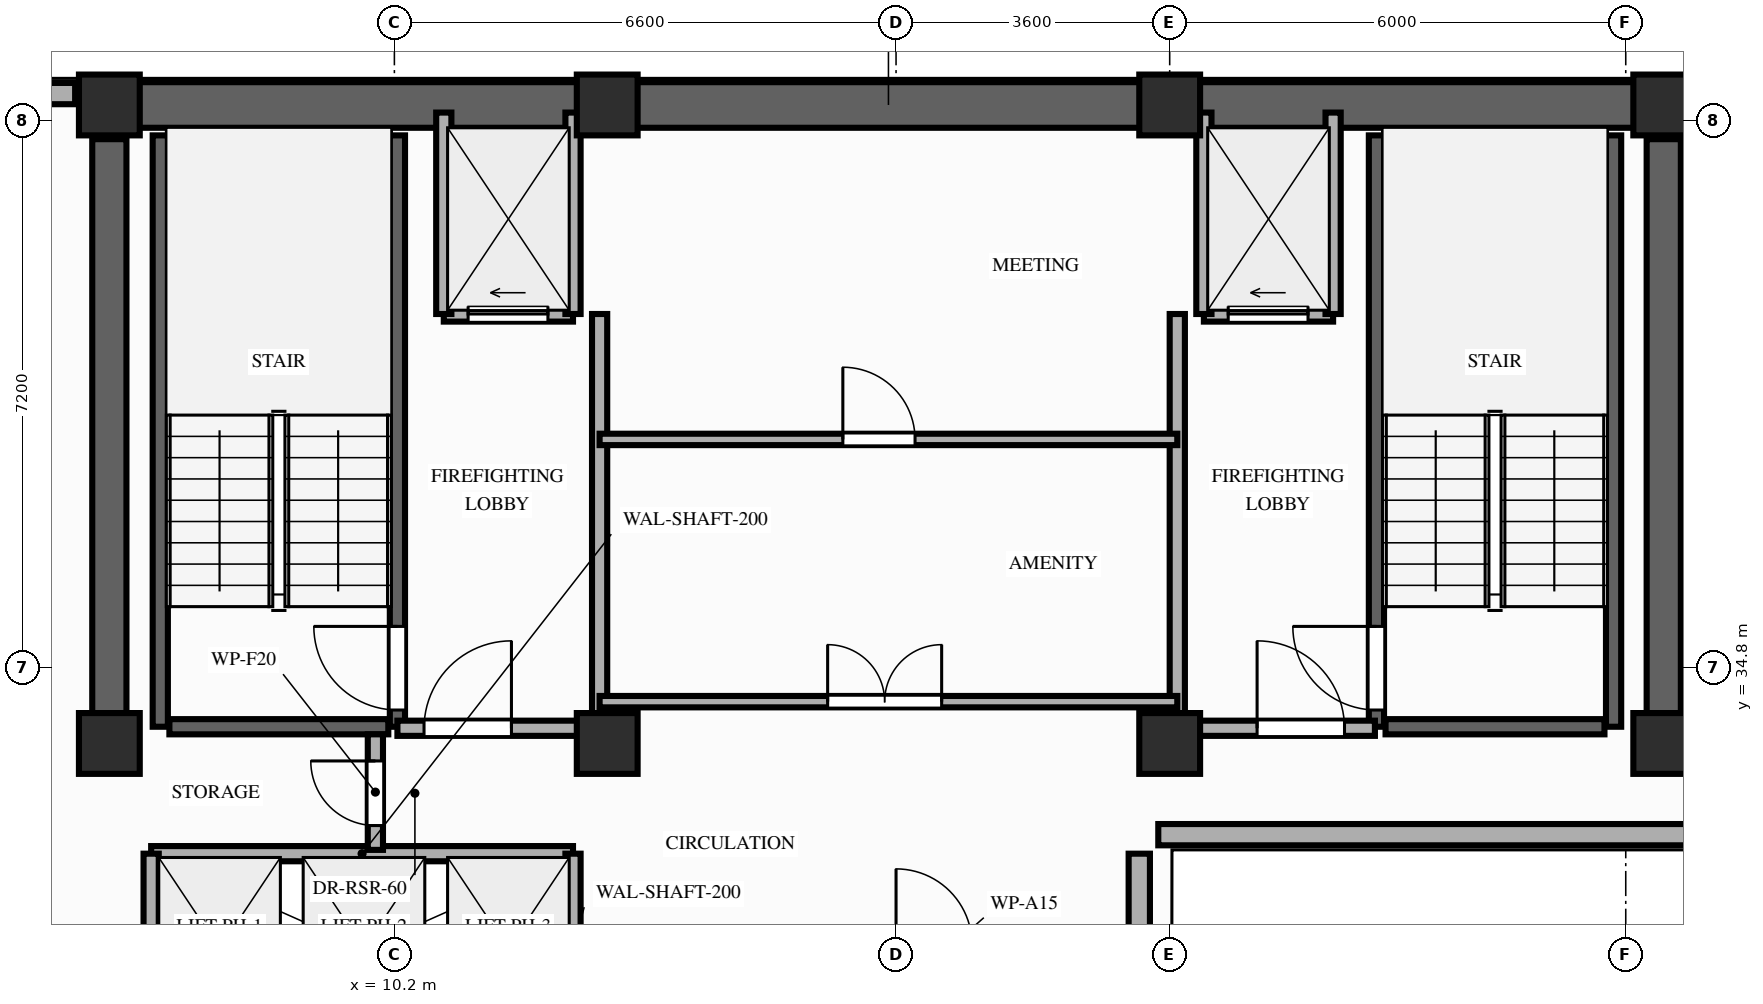
"""IFC4 building model, lengths in metres.
Left out: names, types, materials, properties, quantities, classifications, styles, units other than length and angle.
Written with IfcOpenShell. Run it as: python <this file> out.ifc"""

import sys

from ifc_helpers import new_model, si_unit, direction, frame, frame_2d, origin, origin_2d, place, context, subcontext, project, spatial, rectangle, extrude, element, fill, save


model = new_model("IFC4")
c1 = context("Model", 3, precision=1e-05, world=origin(), true_north=direction((0.0, 1.0)))
c2 = subcontext(c1, "Body", "Model", "MODEL_VIEW")
j1 = project(units=[si_unit("LENGTHUNIT", "METRE"), si_unit("PLANEANGLEUNIT", "RADIAN")], contexts=[c1])
p1 = place(None, origin())
s1 = spatial("IfcSite", under=j1, at=p1, CompositionType="ELEMENT")
p2 = place(p1, origin())
s2 = spatial("IfcBuilding", under=s1, at=p2, CompositionType="ELEMENT")
p3 = place(p2, frame((0.0, 0.0, 224.8)))
s3 = spatial("IfcBuildingStorey", under=s2, at=p3, CompositionType="ELEMENT", Elevation=224.8)
for number, where, z_axis, x_axis in (
    (1, (6.45, 33.8, 0.0), (0.0, 0.0, 1.0), (1.0, 0.0, 0.0)),
    (2, (13.0, 33.8, 0.0), (0.0, 0.0, 1.0), (1.0, 0.0, 0.0)),
    (3, (20.4, 33.8, 0.0), (0.0, 0.0, 1.0), (1.0, 0.0, 0.0)),
    (4, (26.9, 33.8, 0.0), (0.0, 0.0, 1.0), (1.0, 0.0, 0.0)),
    (5, (6.45, 42.2, 0.0), (0.0, 0.0, 1.0), (1.0, 0.0, 0.0)),
    (6, (13.0, 42.2, 0.0), (0.0, 0.0, 1.0), (1.0, 0.0, 0.0)),
    (7, (20.4, 42.2, 0.0), (0.0, 0.0, 1.0), (1.0, 0.0, 0.0)),
    (8, (26.9, 42.2, 0.0), (0.0, 0.0, 1.0), (1.0, 0.0, 0.0)),
):
    element("IfcColumn", number, at=place(p3, frame(where, z_axis=z_axis, x_axis=x_axis)), inside=s3, PredefinedType="COLUMN", context=c2, shape_type="SweptSolid", body=[
        extrude(rectangle(XDim=0.8, YDim=0.8, at=origin_2d()), origin(), (0.0, 0.0, 1.0), 3.2),
    ])
p4 = place(p3, frame((20.0, 8.8, 0.0), z_axis=(0.0, 0.0, 1.0), x_axis=(0.0, 1.0, 0.0)))
e9 = element("IfcWall", 9, at=p4, inside=s3, PredefinedType="STANDARD", context=c2, shape_type="SweptSolid", body=[
    extrude(rectangle(XDim=23.55, YDim=0.28, at=frame_2d((11.775, 0.0))), origin(), (0.0, 0.0, 1.0), 2.51),
])
p5 = place(p4, frame((4.58, 0.0, 0.85)))
e10 = element("IfcOpeningElement", 10, at=p5, cuts=e9, PredefinedType="OPENING", context=c2, shape_type="SweptSolid", body=[
    extrude(rectangle(XDim=0.8, YDim=1.41, at=frame_2d((0.4, 0.705))), frame((0.0, 0.15, 0.0), z_axis=(0.0, -1.0, 0.0), x_axis=(1.0, 0.0, 0.0)), (0.0, 0.0, 1.0), 0.3),
])
p6 = place(p4, frame((5.95, 0.0, 0.85)))
e11 = element("IfcOpeningElement", 11, at=p6, cuts=e9, PredefinedType="OPENING", context=c2, shape_type="SweptSolid", body=[
    extrude(rectangle(XDim=1.5, YDim=1.41, at=frame_2d((0.75, 0.705))), frame((0.0, 0.15, 0.0), z_axis=(0.0, -1.0, 0.0), x_axis=(1.0, 0.0, 0.0)), (0.0, 0.0, 1.0), 0.3),
])
p7 = place(p4, frame((10.85, 0.0, 0.85)))
e12 = element("IfcOpeningElement", 12, at=p7, cuts=e9, PredefinedType="OPENING", context=c2, shape_type="SweptSolid", body=[
    extrude(rectangle(XDim=2.1, YDim=1.41, at=frame_2d((1.05, 0.705))), frame((0.0, 0.15, 0.0), z_axis=(0.0, -1.0, 0.0), x_axis=(1.0, 0.0, 0.0)), (0.0, 0.0, 1.0), 0.3),
])
p8 = place(p3, frame((6.0, 42.35, 0.0), z_axis=(0.0, 0.0, 1.0), x_axis=(-1.0, 0.0, 0.0)))
e13 = element("IfcWall", 13, at=p8, inside=s3, PredefinedType="STANDARD", context=c2, shape_type="SweptSolid", body=[
    extrude(rectangle(XDim=2.0, YDim=0.28, at=frame_2d((1.0, 0.0))), origin(), (0.0, 0.0, 1.0), 3.02),
])
p9 = place(p3, frame((20.25, 32.6, 0.0), z_axis=(0.0, 0.0, 1.0), x_axis=(1.0, 0.0, 0.0)))
e14 = element("IfcWall", 14, at=p9, inside=s3, PredefinedType="STANDARD", context=c2, shape_type="SweptSolid", body=[
    extrude(rectangle(XDim=7.35, YDim=0.28, at=frame_2d((3.675, 0.0))), origin(), (0.0, 0.0, 1.0), 2.51),
])
p10 = place(p3, frame((6.45, 42.2, 0.0), z_axis=(0.0, 0.0, 1.0), x_axis=(1.0, 0.0, 0.0)))
e15 = element("IfcWall", 15, at=p10, inside=s3, PredefinedType="SHEAR", context=c2, shape_type="SweptSolid", body=[
    extrude(rectangle(XDim=20.45, YDim=0.6, at=frame_2d((10.225, 0.0))), origin(), (0.0, 0.0, 1.0), 3.02),
])
for number, where, z_axis, x_axis in (
    (16, (6.45, 33.8, 0.0), (0.0, 0.0, 1.0), (0.0, 1.0, 0.0)),
    (17, (26.9, 33.8, 0.0), (0.0, 0.0, 1.0), (0.0, 1.0, 0.0)),
):
    element("IfcWall", number, at=place(p3, frame(where, z_axis=z_axis, x_axis=x_axis)), inside=s3, PredefinedType="SHEAR", context=c2, shape_type="SweptSolid", body=[
        extrude(rectangle(XDim=7.95, YDim=0.45, at=frame_2d((3.975, 0.0))), origin(), (0.0, 0.0, 1.0), 3.02),
    ])
p11 = place(p3, frame((7.12, 34.02, 0.0), z_axis=(0.0, 0.0, 1.0), x_axis=(0.0, 1.0, 0.0)))
e18 = element("IfcWall", 18, at=p11, inside=s3, PredefinedType="SHEAR", context=c2, shape_type="SweptSolid", body=[
    extrude(rectangle(XDim=7.78, YDim=0.2, at=frame_2d((3.89, 0.0))), origin(), (0.0, 0.0, 1.0), 3.02),
])
p12 = place(p3, frame((10.24, 34.02, 0.0), z_axis=(0.0, 0.0, 1.0), x_axis=(0.0, 1.0, 0.0)))
e19 = element("IfcWall", 19, at=p12, inside=s3, PredefinedType="SHEAR", context=c2, shape_type="SweptSolid", body=[
    extrude(rectangle(XDim=7.78, YDim=0.2, at=frame_2d((3.89, 0.0))), origin(), (0.0, 0.0, 1.0), 3.02),
])
p13 = place(p12, frame((0.22, 0.0, 0.0)))
e20 = element("IfcOpeningElement", 20, at=p13, cuts=e19, PredefinedType="OPENING", context=c2, shape_type="SweptSolid", body=[
    extrude(rectangle(XDim=1.1, YDim=2.15, at=frame_2d((0.55, 1.075))), frame((0.0, 0.11, 0.0), z_axis=(0.0, -1.0, 0.0), x_axis=(1.0, 0.0, 0.0)), (0.0, 0.0, 1.0), 0.22),
])
p14 = place(p3, frame((7.24, 34.02, 0.0), z_axis=(0.0, 0.0, 1.0), x_axis=(1.0, 0.0, 0.0)))
e21 = element("IfcWall", 21, at=p14, inside=s3, PredefinedType="SHEAR", context=c2, shape_type="SweptSolid", body=[
    extrude(rectangle(XDim=2.88, YDim=0.2, at=frame_2d((1.44, 0.0))), origin(), (0.0, 0.0, 1.0), 3.02),
])
p15 = place(p3, frame((23.12, 34.02, 0.0), z_axis=(0.0, 0.0, 1.0), x_axis=(0.0, 1.0, 0.0)))
e22 = element("IfcWall", 22, at=p15, inside=s3, PredefinedType="SHEAR", context=c2, shape_type="SweptSolid", body=[
    extrude(rectangle(XDim=7.78, YDim=0.2, at=frame_2d((3.89, 0.0))), origin(), (0.0, 0.0, 1.0), 3.02),
])
p16 = place(p15, frame((0.22, 0.0, 0.0)))
e23 = element("IfcOpeningElement", 23, at=p16, cuts=e22, PredefinedType="OPENING", context=c2, shape_type="SweptSolid", body=[
    extrude(rectangle(XDim=1.1, YDim=2.15, at=frame_2d((0.55, 1.075))), frame((0.0, 0.11, 0.0), z_axis=(0.0, -1.0, 0.0), x_axis=(1.0, 0.0, 0.0)), (0.0, 0.0, 1.0), 0.22),
])
p17 = place(p3, frame((26.24, 34.02, 0.0), z_axis=(0.0, 0.0, 1.0), x_axis=(0.0, 1.0, 0.0)))
e24 = element("IfcWall", 24, at=p17, inside=s3, PredefinedType="SHEAR", context=c2, shape_type="SweptSolid", body=[
    extrude(rectangle(XDim=7.78, YDim=0.2, at=frame_2d((3.89, 0.0))), origin(), (0.0, 0.0, 1.0), 3.02),
])
p18 = place(p3, frame((23.24, 34.02, 0.0), z_axis=(0.0, 0.0, 1.0), x_axis=(1.0, 0.0, 0.0)))
e25 = element("IfcWall", 25, at=p18, inside=s3, PredefinedType="SHEAR", context=c2, shape_type="SweptSolid", body=[
    extrude(rectangle(XDim=2.88, YDim=0.2, at=frame_2d((1.44, 0.0))), origin(), (0.0, 0.0, 1.0), 3.02),
])
p19 = place(p3, frame((7.0, 32.35, 0.0), z_axis=(0.0, 0.0, 1.0), x_axis=(1.0, 0.0, 0.0)))
e26 = element("IfcWall", 26, at=p19, inside=s3, PredefinedType="MOVABLE", context=c2, shape_type="SweptSolid", body=[
    extrude(rectangle(XDim=5.55, YDim=0.2, at=frame_2d((2.775, 0.0))), origin(), (0.0, 0.0, 1.0), 3.02),
])
for number, where, z_axis, x_axis in (
    (27, (7.0, 29.85, 0.0), (0.0, 0.0, 1.0), (0.0, 1.0, 0.0)),
    (28, (12.55, 29.85, 0.0), (0.0, 0.0, 1.0), (0.0, 1.0, 0.0)),
):
    element("IfcWall", number, at=place(p3, frame(where, z_axis=z_axis, x_axis=x_axis)), inside=s3, PredefinedType="MOVABLE", context=c2, shape_type="SweptSolid", body=[
        extrude(rectangle(XDim=2.5, YDim=0.2, at=frame_2d((1.25, 0.0))), origin(), (0.0, 0.0, 1.0), 3.02),
    ])
p20 = place(p3, frame((10.85, 39.45, 0.0), z_axis=(0.0, 0.0, 1.0), x_axis=(1.0, 0.0, 0.0)))
e29 = element("IfcWall", 29, at=p20, inside=s3, PredefinedType="MOVABLE", context=c2, shape_type="SweptSolid", body=[
    extrude(rectangle(XDim=1.7, YDim=0.2, at=frame_2d((0.85, 0.0))), origin(), (0.0, 0.0, 1.0), 3.02),
])
p21 = place(p20, frame((0.32, 0.0, 0.0)))
e30 = element("IfcOpeningElement", 30, at=p21, cuts=e29, PredefinedType="OPENING", context=c2, shape_type="SweptSolid", body=[
    extrude(rectangle(XDim=1.05, YDim=2.15, at=frame_2d((0.525, 1.075))), frame((0.0, 0.11, 0.0), z_axis=(0.0, -1.0, 0.0), x_axis=(1.0, 0.0, 0.0)), (0.0, 0.0, 1.0), 0.22),
])
p22 = place(p3, frame((20.85, 39.45, 0.0), z_axis=(0.0, 0.0, 1.0), x_axis=(1.0, 0.0, 0.0)))
e31 = element("IfcWall", 31, at=p22, inside=s3, PredefinedType="MOVABLE", context=c2, shape_type="SweptSolid", body=[
    extrude(rectangle(XDim=1.7, YDim=0.2, at=frame_2d((0.85, 0.0))), origin(), (0.0, 0.0, 1.0), 3.02),
])
p23 = place(p22, frame((0.32, 0.0, 0.0)))
e32 = element("IfcOpeningElement", 32, at=p23, cuts=e31, PredefinedType="OPENING", context=c2, shape_type="SweptSolid", body=[
    extrude(rectangle(XDim=1.05, YDim=2.15, at=frame_2d((0.525, 1.075))), frame((0.0, 0.11, 0.0), z_axis=(0.0, -1.0, 0.0), x_axis=(1.0, 0.0, 0.0)), (0.0, 0.0, 1.0), 0.22),
])
for number, where, z_axis, x_axis in (
    (33, (10.85, 39.45, 0.0), (0.0, 0.0, 1.0), (0.0, 1.0, 0.0)),
    (34, (12.55, 39.45, 0.0), (0.0, 0.0, 1.0), (0.0, 1.0, 0.0)),
):
    element("IfcWall", number, at=place(p3, frame(where, z_axis=z_axis, x_axis=x_axis)), inside=s3, PredefinedType="MOVABLE", context=c2, shape_type="SweptSolid", body=[
        extrude(rectangle(XDim=2.65, YDim=0.2, at=frame_2d((1.325, 0.0))), origin(), (0.0, 0.0, 1.0), 2.51),
    ])
p24 = place(p3, frame((12.9, 34.0, 0.0), z_axis=(0.0, 0.0, 1.0), x_axis=(0.0, 1.0, 0.0)))
e35 = element("IfcWall", 35, at=p24, inside=s3, PredefinedType="PARTITIONING", context=c2, shape_type="SweptSolid", body=[
    extrude(rectangle(XDim=5.45, YDim=0.2, at=frame_2d((2.725, 0.0))), origin(), (0.0, 0.0, 1.0), 2.51),
])
p25 = place(p3, frame((10.24, 34.0, 0.0), z_axis=(0.0, 0.0, 1.0), x_axis=(1.0, 0.0, 0.0)))
e36 = element("IfcWall", 36, at=p25, inside=s3, PredefinedType="PARTITIONING", context=c2, shape_type="SweptSolid", body=[
    extrude(rectangle(XDim=2.66, YDim=0.2, at=frame_2d((1.33, 0.0))), origin(), (0.0, 0.0, 1.0), 2.51),
])
p26 = place(p25, frame((0.35, 0.0, 0.0)))
e37 = element("IfcOpeningElement", 37, at=p26, cuts=e36, PredefinedType="OPENING", context=c2, shape_type="SweptSolid", body=[
    extrude(rectangle(XDim=1.15, YDim=2.15, at=frame_2d((0.575, 1.075))), frame((0.0, 0.11, 0.0), z_axis=(0.0, -1.0, 0.0), x_axis=(1.0, 0.0, 0.0)), (0.0, 0.0, 1.0), 0.22),
])
for number, where, z_axis, x_axis in (
    (38, (20.85, 39.45, 0.0), (0.0, 0.0, 1.0), (0.0, 1.0, 0.0)),
    (39, (22.55, 39.45, 0.0), (0.0, 0.0, 1.0), (0.0, 1.0, 0.0)),
):
    element("IfcWall", number, at=place(p3, frame(where, z_axis=z_axis, x_axis=x_axis)), inside=s3, PredefinedType="MOVABLE", context=c2, shape_type="SweptSolid", body=[
        extrude(rectangle(XDim=2.65, YDim=0.2, at=frame_2d((1.325, 0.0))), origin(), (0.0, 0.0, 1.0), 2.51),
    ])
p27 = place(p3, frame((20.5, 34.0, 0.0), z_axis=(0.0, 0.0, 1.0), x_axis=(0.0, 1.0, 0.0)))
e40 = element("IfcWall", 40, at=p27, inside=s3, PredefinedType="PARTITIONING", context=c2, shape_type="SweptSolid", body=[
    extrude(rectangle(XDim=5.45, YDim=0.2, at=frame_2d((2.725, 0.0))), origin(), (0.0, 0.0, 1.0), 2.51),
])
p28 = place(p3, frame((20.5, 34.0, 0.0), z_axis=(0.0, 0.0, 1.0), x_axis=(1.0, 0.0, 0.0)))
e41 = element("IfcWall", 41, at=p28, inside=s3, PredefinedType="PARTITIONING", context=c2, shape_type="SweptSolid", body=[
    extrude(rectangle(XDim=2.6, YDim=0.2, at=frame_2d((1.3, 0.0))), origin(), (0.0, 0.0, 1.0), 2.51),
])
p29 = place(p28, frame((1.05, 0.0, 0.0)))
e42 = element("IfcOpeningElement", 42, at=p29, cuts=e41, PredefinedType="OPENING", context=c2, shape_type="SweptSolid", body=[
    extrude(rectangle(XDim=1.15, YDim=2.15, at=frame_2d((0.575, 1.075))), frame((0.0, 0.11, 0.0), z_axis=(0.0, -1.0, 0.0), x_axis=(1.0, 0.0, 0.0)), (0.0, 0.0, 1.0), 0.22),
])
p30 = place(p3, frame((9.95, 32.4, 0.0), z_axis=(0.0, 0.0, 1.0), x_axis=(0.0, 1.0, 0.0)))
e43 = element("IfcWall", 43, at=p30, inside=s3, PredefinedType="PARTITIONING", context=c2, shape_type="SweptSolid", body=[
    extrude(rectangle(XDim=1.52, YDim=0.2, at=frame_2d((0.76, 0.0))), origin(), (0.0, 0.0, 1.0), 2.51),
])
p31 = place(p30, frame((0.32, 0.0, 0.0)))
e44 = element("IfcOpeningElement", 44, at=p31, cuts=e43, PredefinedType="OPENING", context=c2, shape_type="SweptSolid", body=[
    extrude(rectangle(XDim=0.85, YDim=2.05, at=frame_2d((0.425, 1.025))), frame((0.0, 0.11, 0.0), z_axis=(0.0, -1.0, 0.0), x_axis=(1.0, 0.0, 0.0)), (0.0, 0.0, 1.0), 0.22),
])
p32 = place(p3, frame((12.9, 34.35, 0.0), z_axis=(0.0, 0.0, 1.0), x_axis=(1.0, 0.0, 0.0)))
e45 = element("IfcWall", 45, at=p32, inside=s3, PredefinedType="PARTITIONING", context=c2, shape_type="SweptSolid", body=[
    extrude(rectangle(XDim=7.6, YDim=0.15, at=frame_2d((3.8, 0.0))), origin(), (0.0, 0.0, 1.0), 3.02),
])
p33 = place(p32, frame((3.0, 0.0, 0.0)))
e46 = element("IfcOpeningElement", 46, at=p33, cuts=e45, PredefinedType="OPENING", context=c2, shape_type="SweptSolid", body=[
    extrude(rectangle(XDim=1.5, YDim=2.15, at=frame_2d((0.75, 1.075))), frame((0.0, 0.085, 0.0), z_axis=(0.0, -1.0, 0.0), x_axis=(1.0, 0.0, 0.0)), (0.0, 0.0, 1.0), 0.17),
])
p34 = place(p3, frame((12.9, 37.8, 0.0), z_axis=(0.0, 0.0, 1.0), x_axis=(1.0, 0.0, 0.0)))
e47 = element("IfcWall", 47, at=p34, inside=s3, PredefinedType="PARTITIONING", context=c2, shape_type="SweptSolid", body=[
    extrude(rectangle(XDim=7.6, YDim=0.15, at=frame_2d((3.8, 0.0))), origin(), (0.0, 0.0, 1.0), 3.02),
])
p35 = place(p34, frame((3.2, 0.0, 0.0)))
e48 = element("IfcOpeningElement", 48, at=p35, cuts=e47, PredefinedType="OPENING", context=c2, shape_type="SweptSolid", body=[
    extrude(rectangle(XDim=0.95, YDim=2.15, at=frame_2d((0.475, 1.075))), frame((0.0, 0.085, 0.0), z_axis=(0.0, -1.0, 0.0), x_axis=(1.0, 0.0, 0.0)), (0.0, 0.0, 1.0), 0.17),
])
p36 = place(p13, origin())
e49 = element("IfcDoor", 49, at=p36, inside=s3, OperationType="SINGLE_SWING_RIGHT", PredefinedType="DOOR", context=c2, shape_type="SweptSolid", body=[
    extrude(rectangle(XDim=1.1, YDim=2.15, at=frame_2d((0.55, 1.075))), frame((0.0, 0.025, 0.0), z_axis=(0.0, -1.0, 0.0), x_axis=(1.0, 0.0, 0.0)), (0.0, 0.0, 1.0), 0.05),
])
fill(e20, e49)
p37 = place(p16, origin())
e50 = element("IfcDoor", 50, at=p37, inside=s3, OperationType="SINGLE_SWING_RIGHT", PredefinedType="DOOR", context=c2, shape_type="SweptSolid", body=[
    extrude(rectangle(XDim=1.1, YDim=2.15, at=frame_2d((0.55, 1.075))), frame((0.0, 0.025, 0.0), z_axis=(0.0, -1.0, 0.0), x_axis=(1.0, 0.0, 0.0)), (0.0, 0.0, 1.0), 0.05),
])
fill(e23, e50)
p38 = place(p21, origin())
e51 = element("IfcDoor", 51, at=p38, inside=s3, OperationType="SLIDING_TO_LEFT", PredefinedType="DOOR", context=c2, shape_type="SweptSolid", body=[
    extrude(rectangle(XDim=1.05, YDim=2.15, at=frame_2d((0.525, 1.075))), frame((0.0, 0.025, 0.0), z_axis=(0.0, -1.0, 0.0), x_axis=(1.0, 0.0, 0.0)), (0.0, 0.0, 1.0), 0.05),
])
fill(e30, e51)
p39 = place(p23, origin())
e52 = element("IfcDoor", 52, at=p39, inside=s3, OperationType="SLIDING_TO_LEFT", PredefinedType="DOOR", context=c2, shape_type="SweptSolid", body=[
    extrude(rectangle(XDim=1.05, YDim=2.15, at=frame_2d((0.525, 1.075))), frame((0.0, 0.025, 0.0), z_axis=(0.0, -1.0, 0.0), x_axis=(1.0, 0.0, 0.0)), (0.0, 0.0, 1.0), 0.05),
])
fill(e32, e52)
p40 = place(p26, origin())
e53 = element("IfcDoor", 53, at=p40, inside=s3, OperationType="SINGLE_SWING_RIGHT", PredefinedType="DOOR", context=c2, shape_type="SweptSolid", body=[
    extrude(rectangle(XDim=1.15, YDim=2.15, at=frame_2d((0.575, 1.075))), frame((0.0, 0.025, 0.0), z_axis=(0.0, -1.0, 0.0), x_axis=(1.0, 0.0, 0.0)), (0.0, 0.0, 1.0), 0.05),
])
fill(e37, e53)
p41 = place(p29, origin())
e54 = element("IfcDoor", 54, at=p41, inside=s3, OperationType="SINGLE_SWING_LEFT", PredefinedType="DOOR", context=c2, shape_type="SweptSolid", body=[
    extrude(rectangle(XDim=1.15, YDim=2.15, at=frame_2d((0.575, 1.075))), frame((0.0, 0.025, 0.0), z_axis=(0.0, -1.0, 0.0), x_axis=(1.0, 0.0, 0.0)), (0.0, 0.0, 1.0), 0.05),
])
fill(e42, e54)
p42 = place(p31, origin())
e55 = element("IfcDoor", 55, at=p42, inside=s3, OperationType="SINGLE_SWING_RIGHT", PredefinedType="DOOR", context=c2, shape_type="SweptSolid", body=[
    extrude(rectangle(XDim=0.85, YDim=2.05, at=frame_2d((0.425, 1.025))), frame((0.0, 0.025, 0.0), z_axis=(0.0, -1.0, 0.0), x_axis=(1.0, 0.0, 0.0)), (0.0, 0.0, 1.0), 0.05),
])
fill(e44, e55)
p43 = place(p33, origin())
e56 = element("IfcDoor", 56, at=p43, inside=s3, OperationType="DOUBLE_DOOR_SINGLE_SWING", PredefinedType="DOOR", context=c2, shape_type="SweptSolid", body=[
    extrude(rectangle(XDim=1.5, YDim=2.15, at=frame_2d((0.75, 1.075))), frame((0.0, 0.025, 0.0), z_axis=(0.0, -1.0, 0.0), x_axis=(1.0, 0.0, 0.0)), (0.0, 0.0, 1.0), 0.05),
])
fill(e46, e56)
p44 = place(p35, origin())
e57 = element("IfcDoor", 57, at=p44, inside=s3, OperationType="SINGLE_SWING_LEFT", PredefinedType="DOOR", context=c2, shape_type="SweptSolid", body=[
    extrude(rectangle(XDim=0.95, YDim=2.15, at=frame_2d((0.475, 1.075))), frame((0.0, 0.025, 0.0), z_axis=(0.0, -1.0, 0.0), x_axis=(1.0, 0.0, 0.0)), (0.0, 0.0, 1.0), 0.05),
])
fill(e48, e57)
save(model, sys.argv[1])
